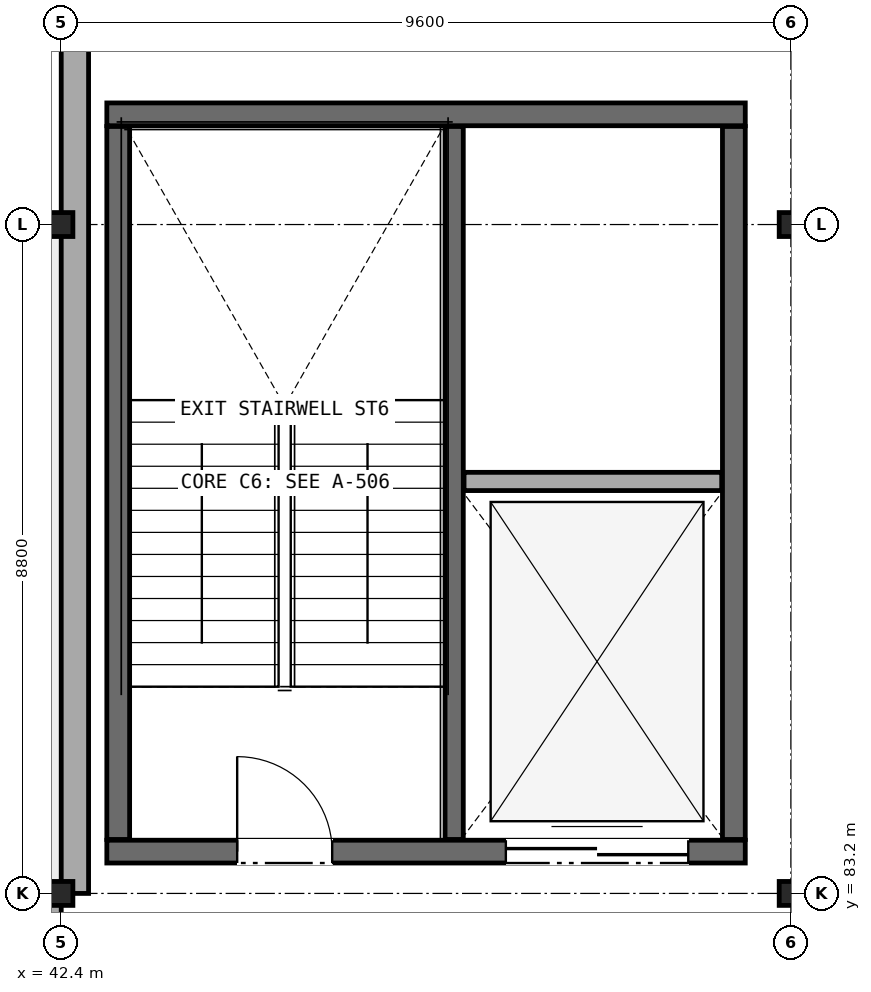
"""IFC4 building model, lengths in metres.
Left out: names, types, materials, properties, quantities, classifications, styles, units other than length and angle.
Written with IfcOpenShell. Run it as: python <this file> out.ifc"""

import sys

from ifc_helpers import new_model, si_unit, direction, frame, frame_2d, origin, origin_2d, place, context, subcontext, project, spatial, rectangle, i_section, extrude, element, fill, save


model = new_model("IFC4")
c1 = context("Model", 3, precision=1e-05, world=origin(), true_north=direction((0.0, 1.0)))
c2 = subcontext(c1, "Body", "Model", "MODEL_VIEW")
j1 = project(units=[si_unit("LENGTHUNIT", "METRE"), si_unit("PLANEANGLEUNIT", "RADIAN")], contexts=[c1])
p1 = place(None, origin())
s1 = spatial("IfcSite", under=j1, at=p1, CompositionType="ELEMENT")
p2 = place(p1, origin())
s2 = spatial("IfcBuilding", under=s1, at=p2, CompositionType="ELEMENT")
p3 = place(p2, frame((0.0, 0.0, 14.6)))
s3 = spatial("IfcBuildingStorey", under=s2, at=p3, CompositionType="ELEMENT", Elevation=14.6)
for number, where, z_axis, x_axis in (
    (1, (42.4, 83.2, 0.0), (0.0, 0.0, 1.0), (1.0, 0.0, 0.0)),
    (2, (42.4, 92.0, 0.0), (0.0, 0.0, 1.0), (1.0, 0.0, 0.0)),
    (3, (52.0, 83.2, 0.0), (0.0, 0.0, 1.0), (1.0, 0.0, 0.0)),
    (4, (52.0, 92.0, 0.0), (0.0, 0.0, 1.0), (1.0, 0.0, 0.0)),
):
    element("IfcColumn", number, at=place(p3, frame(where, z_axis=z_axis, x_axis=x_axis)), inside=s3, PredefinedType="COLUMN", context=c2, shape_type="SweptSolid", body=[
        extrude(i_section(OverallWidth=0.307, OverallDepth=0.315, WebThickness=0.012, FlangeThickness=0.019, FilletRadius=0.017, at=origin_2d()), origin(), (0.0, 0.0, 1.0), 4.5),
    ])
p4 = place(p3, frame((42.58, 115.014, 0.0), z_axis=(0.0, 0.0, 1.0), x_axis=(0.0, -1.0, 0.0)))
e5 = element("IfcWall", 5, at=p4, inside=s3, PredefinedType="SOLIDWALL", context=c2, shape_type="SweptSolid", body=[
    extrude(rectangle(XDim=31.814, YDim=0.36, at=frame_2d((15.907, 0.0))), origin(), (0.0, 0.0, 1.0), 3.662),
])
p5 = place(p4, frame((1.8, 0.0, 0.9)))
e6 = element("IfcOpeningElement", 6, at=p5, cuts=e5, PredefinedType="OPENING", context=c2, shape_type="SweptSolid", body=[
    extrude(rectangle(XDim=1.4, YDim=1.85, at=frame_2d((0.7, 0.925))), frame((0.0, 0.19, 0.0), z_axis=(0.0, -1.0, 0.0), x_axis=(1.0, 0.0, 0.0)), (0.0, 0.0, 1.0), 0.38),
])
p6 = place(p4, frame((11.0, 0.0, 0.9)))
e7 = element("IfcOpeningElement", 7, at=p6, cuts=e5, PredefinedType="OPENING", context=c2, shape_type="SweptSolid", body=[
    extrude(rectangle(XDim=1.55, YDim=1.85, at=frame_2d((0.775, 0.925))), frame((0.0, 0.19, 0.0), z_axis=(0.0, -1.0, 0.0), x_axis=(1.0, 0.0, 0.0)), (0.0, 0.0, 1.0), 0.38),
])
p7 = place(p4, frame((15.6, 0.0, 0.9)))
e8 = element("IfcOpeningElement", 8, at=p7, cuts=e5, PredefinedType="OPENING", context=c2, shape_type="SweptSolid", body=[
    extrude(rectangle(XDim=1.82, YDim=1.85, at=frame_2d((0.91, 0.925))), frame((0.0, 0.19, 0.0), z_axis=(0.0, -1.0, 0.0), x_axis=(1.0, 0.0, 0.0)), (0.0, 0.0, 1.0), 0.38),
])
p8 = place(p3, frame((42.4, 83.02, 0.0), z_axis=(0.0, 0.0, 1.0), x_axis=(-1.0, 0.0, 0.0)))
e9 = element("IfcWall", 9, at=p8, inside=s3, PredefinedType="SOLIDWALL", context=c2, shape_type="SweptSolid", body=[
    extrude(rectangle(XDim=1.6, YDim=0.36, at=frame_2d((0.8, 0.0))), origin(), (0.0, 0.0, 1.0), 3.662),
])
p9 = place(p3, frame((43.0, 83.75, 0.0), z_axis=(0.0, 0.0, 1.0), x_axis=(1.0, 0.0, 0.0)))
e10 = element("IfcWall", 10, at=p9, inside=s3, PredefinedType="SHEAR", context=c2, shape_type="SweptSolid", body=[
    extrude(rectangle(XDim=8.4, YDim=0.3, at=frame_2d((4.2, 0.0))), origin(), (0.0, 0.0, 1.0), 4.205),
])
p10 = place(p9, frame((1.715, 0.0, 0.0)))
e11 = element("IfcOpeningElement", 11, at=p10, cuts=e10, PredefinedType="OPENING", context=c2, shape_type="SweptSolid", body=[
    extrude(rectangle(XDim=1.25, YDim=2.2, at=frame_2d((0.625, 1.1))), frame((0.0, 0.16, 0.0), z_axis=(0.0, -1.0, 0.0), x_axis=(1.0, 0.0, 0.0)), (0.0, 0.0, 1.0), 0.32),
])
p11 = place(p9, frame((5.25, 0.0, 0.0)))
e12 = element("IfcOpeningElement", 12, at=p11, cuts=e10, PredefinedType="OPENING", context=c2, shape_type="SweptSolid", body=[
    extrude(rectangle(XDim=2.4, YDim=2.55, at=frame_2d((1.2, 1.275))), frame((0.0, 0.16, 0.0), z_axis=(0.0, -1.0, 0.0), x_axis=(1.0, 0.0, 0.0)), (0.0, 0.0, 1.0), 0.32),
])
p12 = place(p3, frame((51.4, 93.45, 0.0), z_axis=(0.0, 0.0, 1.0), x_axis=(-1.0, 0.0, 0.0)))
e13 = element("IfcWall", 13, at=p12, inside=s3, PredefinedType="SHEAR", context=c2, shape_type="SweptSolid", body=[
    extrude(rectangle(XDim=8.4, YDim=0.3, at=frame_2d((4.2, 0.0))), origin(), (0.0, 0.0, 1.0), 4.205),
])
for number, where, z_axis, x_axis in (
    (14, (51.25, 83.91, 0.0), (0.0, 0.0, 1.0), (0.0, 1.0, 0.0)),
    (15, (43.15, 93.29, 0.0), (0.0, 0.0, 1.0), (0.0, -1.0, 0.0)),
):
    element("IfcWall", number, at=place(p3, frame(where, z_axis=z_axis, x_axis=x_axis)), inside=s3, PredefinedType="SHEAR", context=c2, shape_type="SweptSolid", body=[
        extrude(rectangle(XDim=9.38, YDim=0.3, at=frame_2d((4.69, 0.0))), origin(), (0.0, 0.0, 1.0), 4.205),
    ])
p13 = place(p3, frame((47.57, 83.91, 0.0), z_axis=(0.0, 0.0, 1.0), x_axis=(0.0, 1.0, 0.0)))
e16 = element("IfcWall", 16, at=p13, inside=s3, PredefinedType="SOLIDWALL", context=c2, shape_type="SweptSolid", body=[
    extrude(rectangle(XDim=9.38, YDim=0.24, at=frame_2d((4.69, 0.0))), origin(), (0.0, 0.0, 1.0), 4.205),
])
p14 = place(p3, frame((47.7, 88.62, 0.0), z_axis=(0.0, 0.0, 1.0), x_axis=(1.0, 0.0, 0.0)))
e17 = element("IfcWall", 17, at=p14, inside=s3, PredefinedType="SOLIDWALL", context=c2, shape_type="SweptSolid", body=[
    extrude(rectangle(XDim=3.39, YDim=0.24, at=frame_2d((1.695, 0.0))), origin(), (0.0, 0.0, 1.0), 4.205),
])
p15 = place(p10, origin())
e18 = element("IfcDoor", 18, at=p15, inside=s3, OperationType="SINGLE_SWING_LEFT", PredefinedType="DOOR", context=c2, shape_type="SweptSolid", body=[
    extrude(rectangle(XDim=1.25, YDim=2.2, at=frame_2d((0.625, 1.1))), frame((0.0, 0.025, 0.0), z_axis=(0.0, -1.0, 0.0), x_axis=(1.0, 0.0, 0.0)), (0.0, 0.0, 1.0), 0.05),
])
fill(e11, e18)
p16 = place(p11, origin())
e19 = element("IfcDoor", 19, at=p16, inside=s3, OperationType="DOUBLE_DOOR_SLIDING", PredefinedType="DOOR", context=c2, shape_type="SweptSolid", body=[
    extrude(rectangle(XDim=2.4, YDim=2.55, at=frame_2d((1.2, 1.275))), frame((0.0, 0.025, 0.0), z_axis=(0.0, -1.0, 0.0), x_axis=(1.0, 0.0, 0.0)), (0.0, 0.0, 1.0), 0.05),
])
fill(e12, e19)
save(model, sys.argv[1])
